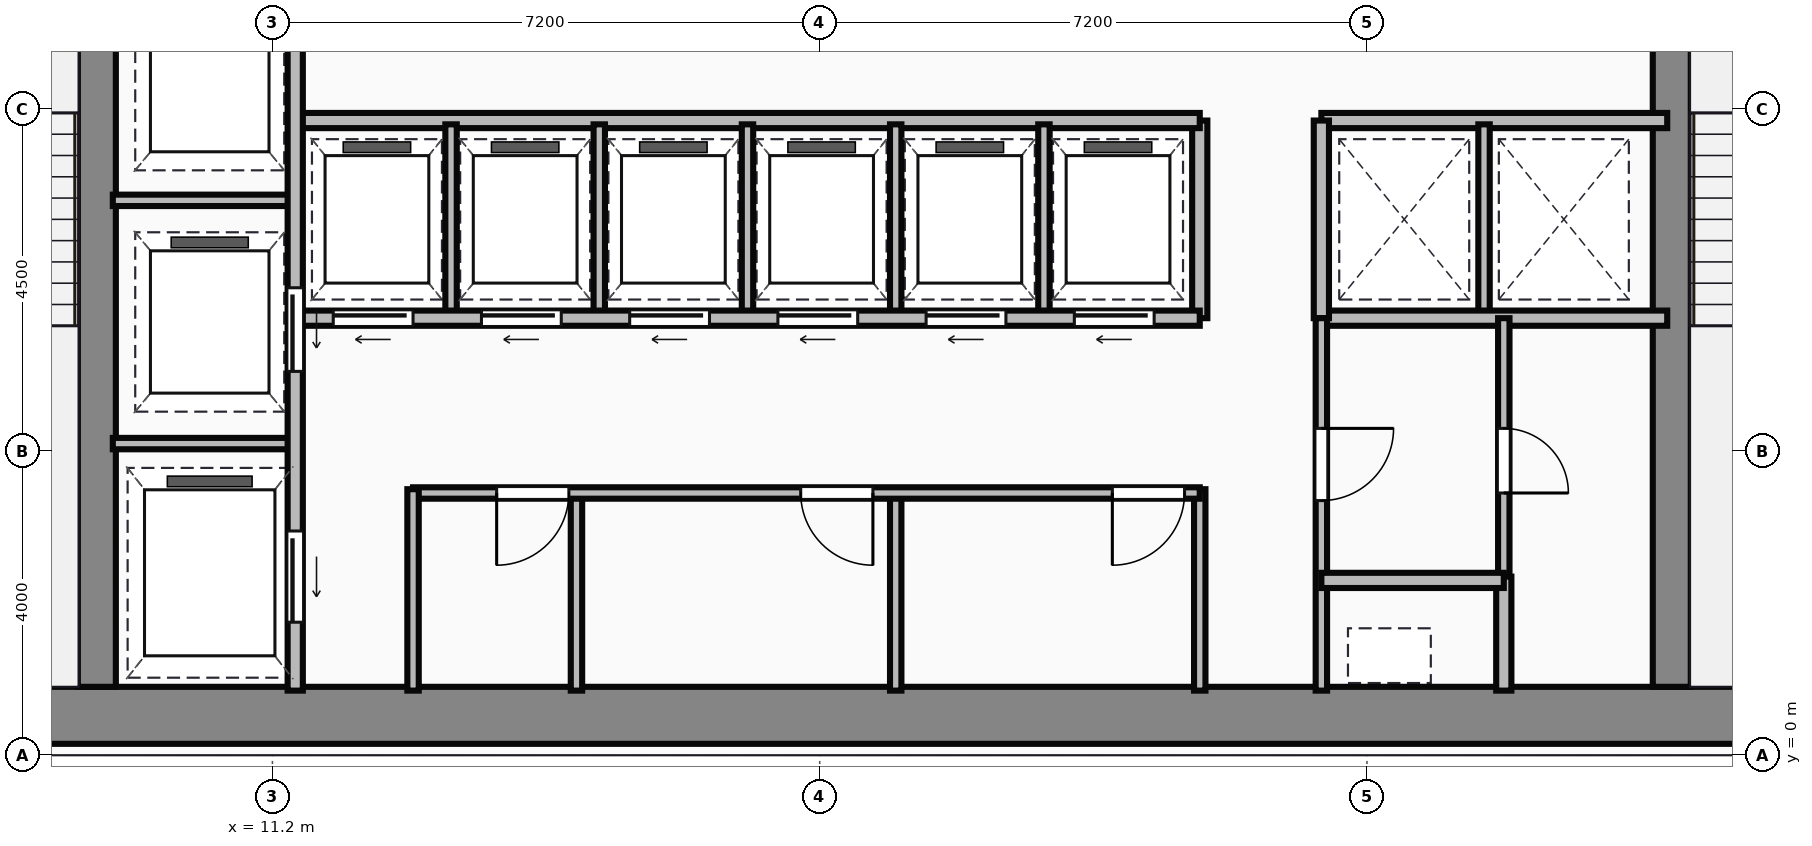
"""IFC4 building model, lengths in metres.
Left out: names, types, materials, properties, quantities, classifications, styles, units other than length and angle.
Written with IfcOpenShell. Run it as: python <this file> out.ifc"""

import sys

from ifc_helpers import new_model, si_unit, direction, frame, frame_2d, origin, place, context, subcontext, project, spatial, rectangle, extrude, source, transform, mapped, element, fill, save


model = new_model("IFC4")
c1 = context("Model", 3, precision=1e-05, world=origin(), true_north=direction((0.0, 1.0)))
c2 = subcontext(c1, "Body", "Model", "MODEL_VIEW")
j1 = project(units=[si_unit("LENGTHUNIT", "METRE"), si_unit("PLANEANGLEUNIT", "RADIAN")], contexts=[c1])
p1 = place(None, origin())
s1 = spatial("IfcSite", under=j1, at=p1, CompositionType="ELEMENT")
p2 = place(p1, origin())
s2 = spatial("IfcBuilding", under=s1, at=p2, CompositionType="ELEMENT")
p3 = place(p2, frame((0.0, 0.0, 177.1)))
s3 = spatial("IfcBuildingStorey", under=s2, at=p3, CompositionType="ELEMENT", Elevation=177.1)
m1 = source(origin(), c2, "Body", "SweptSolid", [
    extrude(rectangle(XDim=29.5, YDim=0.75, at=frame_2d((14.75, 0.0))), origin(), (0.0, 0.0, 1.0), 3.65),
])
p4 = place(p3, frame((4.5, 0.525, 0.0), z_axis=(0.0, 0.0, 1.0), x_axis=(1.0, 0.0, 0.0)))
e1 = element("IfcWall", 1, at=p4, inside=s3, PredefinedType="SHEAR", context=c2, shape_type="MappedRepresentation", body=[
    mapped(m1, transform((0.0, 0.0, 0.0))),
])
m2 = source(origin(), c2, "Body", "SweptSolid", [
    extrude(rectangle(XDim=12.35, YDim=0.5, at=frame_2d((6.175, 0.0))), origin(), (0.0, 0.0, 1.0), 3.65),
])
for number, where, z_axis, x_axis in (
    (2, (8.89, 0.9, 0.0), (0.0, 0.0, 1.0), (0.0, 1.0, 0.0)),
    (3, (29.61, 0.9, 0.0), (0.0, 0.0, 1.0), (0.0, 1.0, 0.0)),
):
    element("IfcWall", number, at=place(p3, frame(where, z_axis=z_axis, x_axis=x_axis)), inside=s3, PredefinedType="SHEAR", context=c2, shape_type="MappedRepresentation", body=[
        mapped(m2, transform((0.0, 0.0, 0.0))),
    ])
m3 = source(origin(), c2, "Body", "SweptSolid", [
    extrude(rectangle(XDim=9.6, YDim=0.2, at=frame_2d((4.8, 0.0))), origin(), (0.0, 0.0, 1.0), 3.4),
])
p5 = place(p3, frame((11.5, 0.85, 0.0), z_axis=(0.0, 0.0, 1.0), x_axis=(0.0, 1.0, 0.0)))
e4 = element("IfcWall", 4, at=p5, inside=s3, PredefinedType="PARTITIONING", context=c2, shape_type="MappedRepresentation", body=[
    mapped(m3, transform((0.0, 0.0, 0.0))),
])
p6 = place(p5, frame((4.2, 0.0, 0.0)))
e5 = element("IfcOpeningElement", 5, at=p6, cuts=e4, PredefinedType="OPENING", context=c2, shape_type="SweptSolid", body=[
    extrude(rectangle(XDim=1.1, YDim=2.15, at=frame_2d((0.55, 1.075))), frame((0.0, 0.11, 0.0), z_axis=(0.0, -1.0, 0.0), x_axis=(1.0, 0.0, 0.0)), (0.0, 0.0, 1.0), 0.22),
])
p7 = place(p5, frame((0.9, 0.0, 0.0)))
e6 = element("IfcOpeningElement", 6, at=p7, cuts=e4, PredefinedType="OPENING", context=c2, shape_type="SweptSolid", body=[
    extrude(rectangle(XDim=1.2, YDim=2.15, at=frame_2d((0.6, 1.075))), frame((0.0, 0.11, 0.0), z_axis=(0.0, -1.0, 0.0), x_axis=(1.0, 0.0, 0.0)), (0.0, 0.0, 1.0), 0.22),
])
m4 = source(origin(), c2, "Body", "SweptSolid", [
    extrude(rectangle(XDim=2.4, YDim=0.15, at=frame_2d((1.2, 0.0))), origin(), (0.0, 0.0, 1.0), 3.4),
])
for number, where, z_axis, x_axis in (
    (7, (9.1, 4.1, 0.0), (0.0, 0.0, 1.0), (1.0, 0.0, 0.0)),
    (8, (9.1, 7.3, 0.0), (0.0, 0.0, 1.0), (1.0, 0.0, 0.0)),
):
    element("IfcWall", number, at=place(p3, frame(where, z_axis=z_axis, x_axis=x_axis)), inside=s3, PredefinedType="PARTITIONING", context=c2, shape_type="MappedRepresentation", body=[
        mapped(m4, transform((0.0, 0.0, 0.0))),
    ])
m5 = source(origin(), c2, "Body", "SweptSolid", [
    extrude(rectangle(XDim=2.65, YDim=0.15, at=frame_2d((1.325, 0.0))), origin(), (0.0, 0.0, 1.0), 3.4),
])
p8 = place(p3, frame((13.05, 0.85, 0.0), z_axis=(0.0, 0.0, 1.0), x_axis=(0.0, 1.0, 0.0)))
e9 = element("IfcWall", 9, at=p8, inside=s3, PredefinedType="PARTITIONING", context=c2, shape_type="MappedRepresentation", body=[
    mapped(m5, transform((0.0, 0.0, 0.0))),
])
m6 = source(origin(), c2, "Body", "SweptSolid", [
    extrude(rectangle(XDim=10.35, YDim=0.15, at=frame_2d((5.175, 0.0))), origin(), (0.0, 0.0, 1.0), 3.4),
])
p9 = place(p3, frame((13.05, 3.45, 0.0), z_axis=(0.0, 0.0, 1.0), x_axis=(1.0, 0.0, 0.0)))
e10 = element("IfcWall", 10, at=p9, inside=s3, PredefinedType="PARTITIONING", context=c2, shape_type="MappedRepresentation", body=[
    mapped(m6, transform((0.0, 0.0, 0.0))),
])
p10 = place(p9, frame((1.1, 0.0, 0.0)))
e11 = element("IfcOpeningElement", 11, at=p10, cuts=e10, PredefinedType="OPENING", context=c2, shape_type="SweptSolid", body=[
    extrude(rectangle(XDim=0.95, YDim=2.15, at=frame_2d((0.475, 1.075))), frame((0.0, 0.085, 0.0), z_axis=(0.0, -1.0, 0.0), x_axis=(1.0, 0.0, 0.0)), (0.0, 0.0, 1.0), 0.17),
])
p11 = place(p9, frame((5.1, 0.0, 0.0)))
e12 = element("IfcOpeningElement", 12, at=p11, cuts=e10, PredefinedType="OPENING", context=c2, shape_type="SweptSolid", body=[
    extrude(rectangle(XDim=0.95, YDim=2.15, at=frame_2d((0.475, 1.075))), frame((0.0, 0.085, 0.0), z_axis=(0.0, -1.0, 0.0), x_axis=(1.0, 0.0, 0.0)), (0.0, 0.0, 1.0), 0.17),
])
p12 = place(p9, frame((9.2, 0.0, 0.0)))
e13 = element("IfcOpeningElement", 13, at=p12, cuts=e10, PredefinedType="OPENING", context=c2, shape_type="SweptSolid", body=[
    extrude(rectangle(XDim=0.95, YDim=2.15, at=frame_2d((0.475, 1.075))), frame((0.0, 0.085, 0.0), z_axis=(0.0, -1.0, 0.0), x_axis=(1.0, 0.0, 0.0)), (0.0, 0.0, 1.0), 0.17),
])
p13 = place(p3, frame((23.4, 0.85, 0.0), z_axis=(0.0, 0.0, 1.0), x_axis=(0.0, 1.0, 0.0)))
e14 = element("IfcWall", 14, at=p13, inside=s3, PredefinedType="PARTITIONING", context=c2, shape_type="MappedRepresentation", body=[
    mapped(m5, transform((0.0, 0.0, 0.0))),
])
m7 = source(origin(), c2, "Body", "SweptSolid", [
    extrude(rectangle(XDim=2.6, YDim=0.15, at=frame_2d((1.3, 0.0))), origin(), (0.0, 0.0, 1.0), 3.4),
])
for number, where, z_axis, x_axis in (
    (15, (15.2, 0.85, 0.0), (0.0, 0.0, 1.0), (0.0, 1.0, 0.0)),
    (16, (19.4, 0.85, 0.0), (0.0, 0.0, 1.0), (0.0, 1.0, 0.0)),
):
    element("IfcWall", number, at=place(p3, frame(where, z_axis=z_axis, x_axis=x_axis)), inside=s3, PredefinedType="PARTITIONING", context=c2, shape_type="MappedRepresentation", body=[
        mapped(m7, transform((0.0, 0.0, 0.0))),
    ])
m8 = source(origin(), c2, "Body", "SweptSolid", [
    extrude(rectangle(XDim=11.85, YDim=0.2, at=frame_2d((5.925, 0.0))), origin(), (0.0, 0.0, 1.0), 3.4),
])
p14 = place(p3, frame((11.55, 5.75, 0.0), z_axis=(0.0, 0.0, 1.0), x_axis=(1.0, 0.0, 0.0)))
e17 = element("IfcWall", 17, at=p14, inside=s3, PredefinedType="PARTITIONING", context=c2, shape_type="MappedRepresentation", body=[
    mapped(m8, transform((0.0, 0.0, 0.0))),
])
p15 = place(p14, frame((0.45, 0.0, 0.0)))
e18 = element("IfcOpeningElement", 18, at=p15, cuts=e17, PredefinedType="OPENING", context=c2, shape_type="SweptSolid", body=[
    extrude(rectangle(XDim=1.05, YDim=2.15, at=frame_2d((0.525, 1.075))), frame((0.0, 0.11, 0.0), z_axis=(0.0, -1.0, 0.0), x_axis=(1.0, 0.0, 0.0)), (0.0, 0.0, 1.0), 0.22),
])
p16 = place(p14, frame((2.4, 0.0, 0.0)))
e19 = element("IfcOpeningElement", 19, at=p16, cuts=e17, PredefinedType="OPENING", context=c2, shape_type="SweptSolid", body=[
    extrude(rectangle(XDim=1.05, YDim=2.15, at=frame_2d((0.525, 1.075))), frame((0.0, 0.11, 0.0), z_axis=(0.0, -1.0, 0.0), x_axis=(1.0, 0.0, 0.0)), (0.0, 0.0, 1.0), 0.22),
])
p17 = place(p14, frame((4.35, 0.0, 0.0)))
e20 = element("IfcOpeningElement", 20, at=p17, cuts=e17, PredefinedType="OPENING", context=c2, shape_type="SweptSolid", body=[
    extrude(rectangle(XDim=1.05, YDim=2.15, at=frame_2d((0.525, 1.075))), frame((0.0, 0.11, 0.0), z_axis=(0.0, -1.0, 0.0), x_axis=(1.0, 0.0, 0.0)), (0.0, 0.0, 1.0), 0.22),
])
p18 = place(p14, frame((6.3, 0.0, 0.0)))
e21 = element("IfcOpeningElement", 21, at=p18, cuts=e17, PredefinedType="OPENING", context=c2, shape_type="SweptSolid", body=[
    extrude(rectangle(XDim=1.05, YDim=2.15, at=frame_2d((0.525, 1.075))), frame((0.0, 0.11, 0.0), z_axis=(0.0, -1.0, 0.0), x_axis=(1.0, 0.0, 0.0)), (0.0, 0.0, 1.0), 0.22),
])
p19 = place(p14, frame((8.25, 0.0, 0.0)))
e22 = element("IfcOpeningElement", 22, at=p19, cuts=e17, PredefinedType="OPENING", context=c2, shape_type="SweptSolid", body=[
    extrude(rectangle(XDim=1.05, YDim=2.15, at=frame_2d((0.525, 1.075))), frame((0.0, 0.11, 0.0), z_axis=(0.0, -1.0, 0.0), x_axis=(1.0, 0.0, 0.0)), (0.0, 0.0, 1.0), 0.22),
])
p20 = place(p14, frame((10.2, 0.0, 0.0)))
e23 = element("IfcOpeningElement", 23, at=p20, cuts=e17, PredefinedType="OPENING", context=c2, shape_type="SweptSolid", body=[
    extrude(rectangle(XDim=1.05, YDim=2.15, at=frame_2d((0.525, 1.075))), frame((0.0, 0.11, 0.0), z_axis=(0.0, -1.0, 0.0), x_axis=(1.0, 0.0, 0.0)), (0.0, 0.0, 1.0), 0.22),
])
p21 = place(p3, frame((11.55, 8.35, 0.0), z_axis=(0.0, 0.0, 1.0), x_axis=(1.0, 0.0, 0.0)))
e24 = element("IfcWall", 24, at=p21, inside=s3, PredefinedType="PARTITIONING", context=c2, shape_type="MappedRepresentation", body=[
    mapped(m8, transform((0.0, 0.0, 0.0))),
])
m9 = source(origin(), c2, "Body", "SweptSolid", [
    extrude(rectangle(XDim=2.6, YDim=0.2, at=frame_2d((1.3, 0.0))), origin(), (0.0, 0.0, 1.0), 3.4),
])
p22 = place(p3, frame((23.4, 5.75, 0.0), z_axis=(0.0, 0.0, 1.0), x_axis=(0.0, 1.0, 0.0)))
e25 = element("IfcWall", 25, at=p22, inside=s3, PredefinedType="PARTITIONING", context=c2, shape_type="MappedRepresentation", body=[
    mapped(m9, transform((0.0, 0.0, 0.0))),
])
m10 = source(origin(), c2, "Body", "SweptSolid", [
    extrude(rectangle(XDim=2.5, YDim=0.15, at=frame_2d((1.25, 0.0))), origin(), (0.0, 0.0, 1.0), 3.4),
])
for number, where, z_axis, x_axis in (
    (26, (13.55, 5.8, 0.0), (0.0, 0.0, 1.0), (0.0, 1.0, 0.0)),
    (27, (15.5, 5.8, 0.0), (0.0, 0.0, 1.0), (0.0, 1.0, 0.0)),
    (28, (17.45, 5.8, 0.0), (0.0, 0.0, 1.0), (0.0, 1.0, 0.0)),
    (29, (19.4, 5.8, 0.0), (0.0, 0.0, 1.0), (0.0, 1.0, 0.0)),
    (30, (21.35, 5.8, 0.0), (0.0, 0.0, 1.0), (0.0, 1.0, 0.0)),
):
    element("IfcWall", number, at=place(p3, frame(where, z_axis=z_axis, x_axis=x_axis)), inside=s3, PredefinedType="PARTITIONING", context=c2, shape_type="MappedRepresentation", body=[
        mapped(m10, transform((0.0, 0.0, 0.0))),
    ])
m11 = source(origin(), c2, "Body", "SweptSolid", [
    extrude(rectangle(XDim=4.55, YDim=0.2, at=frame_2d((2.275, 0.0))), origin(), (0.0, 0.0, 1.0), 3.4),
])
for number, where, z_axis, x_axis in (
    (31, (25.0, 8.35, 0.0), (0.0, 0.0, 1.0), (1.0, 0.0, 0.0)),
    (32, (25.0, 5.75, 0.0), (0.0, 0.0, 1.0), (1.0, 0.0, 0.0)),
):
    element("IfcWall", number, at=place(p3, frame(where, z_axis=z_axis, x_axis=x_axis)), inside=s3, PredefinedType="PARTITIONING", context=c2, shape_type="MappedRepresentation", body=[
        mapped(m11, transform((0.0, 0.0, 0.0))),
    ])
p23 = place(p3, frame((25.0, 5.75, 0.0), z_axis=(0.0, 0.0, 1.0), x_axis=(0.0, 1.0, 0.0)))
e33 = element("IfcWall", 33, at=p23, inside=s3, PredefinedType="PARTITIONING", context=c2, shape_type="MappedRepresentation", body=[
    mapped(m9, transform((0.0, 0.0, 0.0))),
])
p24 = place(p3, frame((27.14, 5.8, 0.0), z_axis=(0.0, 0.0, 1.0), x_axis=(0.0, 1.0, 0.0)))
e34 = element("IfcWall", 34, at=p24, inside=s3, PredefinedType="PARTITIONING", context=c2, shape_type="MappedRepresentation", body=[
    mapped(m10, transform((0.0, 0.0, 0.0))),
])
m12 = source(origin(), c2, "Body", "SweptSolid", [
    extrude(rectangle(XDim=4.9, YDim=0.15, at=frame_2d((2.45, 0.0))), origin(), (0.0, 0.0, 1.0), 3.4),
])
p25 = place(p3, frame((25.0, 0.85, 0.0), z_axis=(0.0, 0.0, 1.0), x_axis=(0.0, 1.0, 0.0)))
e35 = element("IfcWall", 35, at=p25, inside=s3, PredefinedType="PARTITIONING", context=c2, shape_type="MappedRepresentation", body=[
    mapped(m12, transform((0.0, 0.0, 0.0))),
])
p26 = place(p25, frame((2.5, 0.0, 0.0)))
e36 = element("IfcOpeningElement", 36, at=p26, cuts=e35, PredefinedType="OPENING", context=c2, shape_type="SweptSolid", body=[
    extrude(rectangle(XDim=0.95, YDim=2.15, at=frame_2d((0.475, 1.075))), frame((0.0, 0.085, 0.0), z_axis=(0.0, -1.0, 0.0), x_axis=(1.0, 0.0, 0.0)), (0.0, 0.0, 1.0), 0.17),
])
m13 = source(origin(), c2, "Body", "SweptSolid", [
    extrude(rectangle(XDim=2.4, YDim=0.2, at=frame_2d((1.2, 0.0))), origin(), (0.0, 0.0, 1.0), 3.4),
])
p27 = place(p3, frame((25.0, 2.3, 0.0), z_axis=(0.0, 0.0, 1.0), x_axis=(1.0, 0.0, 0.0)))
e37 = element("IfcWall", 37, at=p27, inside=s3, PredefinedType="PARTITIONING", context=c2, shape_type="MappedRepresentation", body=[
    mapped(m13, transform((0.0, 0.0, 0.0))),
])
m14 = source(origin(), c2, "Body", "SweptSolid", [
    extrude(rectangle(XDim=1.5, YDim=0.2, at=frame_2d((0.75, 0.0))), origin(), (0.0, 0.0, 1.0), 3.4),
])
p28 = place(p3, frame((27.4, 0.85, 0.0), z_axis=(0.0, 0.0, 1.0), x_axis=(0.0, 1.0, 0.0)))
e38 = element("IfcWall", 38, at=p28, inside=s3, PredefinedType="PARTITIONING", context=c2, shape_type="MappedRepresentation", body=[
    mapped(m14, transform((0.0, 0.0, 0.0))),
])
m15 = source(origin(), c2, "Body", "SweptSolid", [
    extrude(rectangle(XDim=3.4, YDim=0.15, at=frame_2d((1.7, 0.0))), origin(), (0.0, 0.0, 1.0), 3.4),
])
p29 = place(p3, frame((27.4, 2.35, 0.0), z_axis=(0.0, 0.0, 1.0), x_axis=(0.0, 1.0, 0.0)))
e39 = element("IfcWall", 39, at=p29, inside=s3, PredefinedType="PARTITIONING", context=c2, shape_type="MappedRepresentation", body=[
    mapped(m15, transform((0.0, 0.0, 0.0))),
])
p30 = place(p29, frame((1.1, 0.0, 0.0)))
e40 = element("IfcOpeningElement", 40, at=p30, cuts=e39, PredefinedType="OPENING", context=c2, shape_type="SweptSolid", body=[
    extrude(rectangle(XDim=0.85, YDim=2.1, at=frame_2d((0.425, 1.05))), frame((0.0, 0.085, 0.0), z_axis=(0.0, -1.0, 0.0), x_axis=(1.0, 0.0, 0.0)), (0.0, 0.0, 1.0), 0.17),
])
m16 = source(origin(), c2, "Body", "SweptSolid", [
    extrude(rectangle(XDim=1.1, YDim=2.15, at=frame_2d((0.55, 1.075))), frame((0.0, 0.025, 0.0), z_axis=(0.0, -1.0, 0.0), x_axis=(1.0, 0.0, 0.0)), (0.0, 0.0, 1.0), 0.05),
])
p31 = place(p6, frame((1.1, 0.0, 0.0), z_axis=(0.0, 0.0, 1.0), x_axis=(-1.0, 0.0, 0.0)))
e41 = element("IfcDoor", 41, at=p31, inside=s3, OperationType="SLIDING_TO_LEFT", PredefinedType="DOOR", context=c2, shape_type="MappedRepresentation", body=[
    mapped(m16, transform((0.0, 0.0, 0.0))),
])
fill(e5, e41)
m17 = source(origin(), c2, "Body", "SweptSolid", [
    extrude(rectangle(XDim=1.2, YDim=2.15, at=frame_2d((0.6, 1.075))), frame((0.0, 0.025, 0.0), z_axis=(0.0, -1.0, 0.0), x_axis=(1.0, 0.0, 0.0)), (0.0, 0.0, 1.0), 0.05),
])
p32 = place(p7, frame((1.2, 0.0, 0.0), z_axis=(0.0, 0.0, 1.0), x_axis=(-1.0, 0.0, 0.0)))
e42 = element("IfcDoor", 42, at=p32, inside=s3, OperationType="SLIDING_TO_LEFT", PredefinedType="DOOR", context=c2, shape_type="MappedRepresentation", body=[
    mapped(m17, transform((0.0, 0.0, 0.0))),
])
fill(e6, e42)
m18 = source(origin(), c2, "Body", "SweptSolid", [
    extrude(rectangle(XDim=0.95, YDim=2.15, at=frame_2d((0.475, 1.075))), frame((0.0, 0.025, 0.0), z_axis=(0.0, -1.0, 0.0), x_axis=(1.0, 0.0, 0.0)), (0.0, 0.0, 1.0), 0.05),
])
p33 = place(p10, origin())
e43 = element("IfcDoor", 43, at=p33, inside=s3, OperationType="SINGLE_SWING_LEFT", PredefinedType="DOOR", context=c2, shape_type="MappedRepresentation", body=[
    mapped(m18, transform((0.0, 0.0, 0.0))),
])
fill(e11, e43)
p34 = place(p11, origin())
e44 = element("IfcDoor", 44, at=p34, inside=s3, OperationType="SINGLE_SWING_RIGHT", PredefinedType="DOOR", context=c2, shape_type="MappedRepresentation", body=[
    mapped(m18, transform((0.0, 0.0, 0.0))),
])
fill(e12, e44)
p35 = place(p12, origin())
e45 = element("IfcDoor", 45, at=p35, inside=s3, OperationType="SINGLE_SWING_LEFT", PredefinedType="DOOR", context=c2, shape_type="MappedRepresentation", body=[
    mapped(m18, transform((0.0, 0.0, 0.0))),
])
fill(e13, e45)
m19 = source(origin(), c2, "Body", "SweptSolid", [
    extrude(rectangle(XDim=1.05, YDim=2.15, at=frame_2d((0.525, 1.075))), frame((0.0, 0.025, 0.0), z_axis=(0.0, -1.0, 0.0), x_axis=(1.0, 0.0, 0.0)), (0.0, 0.0, 1.0), 0.05),
])
p36 = place(p15, frame((1.05, 0.0, 0.0), z_axis=(0.0, 0.0, 1.0), x_axis=(-1.0, 0.0, 0.0)))
e46 = element("IfcDoor", 46, at=p36, inside=s3, OperationType="SLIDING_TO_LEFT", PredefinedType="DOOR", context=c2, shape_type="MappedRepresentation", body=[
    mapped(m19, transform((0.0, 0.0, 0.0))),
])
fill(e18, e46)
p37 = place(p16, frame((1.05, 0.0, 0.0), z_axis=(0.0, 0.0, 1.0), x_axis=(-1.0, 0.0, 0.0)))
e47 = element("IfcDoor", 47, at=p37, inside=s3, OperationType="SLIDING_TO_LEFT", PredefinedType="DOOR", context=c2, shape_type="MappedRepresentation", body=[
    mapped(m19, transform((0.0, 0.0, 0.0))),
])
fill(e19, e47)
p38 = place(p17, frame((1.05, 0.0, 0.0), z_axis=(0.0, 0.0, 1.0), x_axis=(-1.0, 0.0, 0.0)))
e48 = element("IfcDoor", 48, at=p38, inside=s3, OperationType="SLIDING_TO_LEFT", PredefinedType="DOOR", context=c2, shape_type="MappedRepresentation", body=[
    mapped(m19, transform((0.0, 0.0, 0.0))),
])
fill(e20, e48)
p39 = place(p18, frame((1.05, 0.0, 0.0), z_axis=(0.0, 0.0, 1.0), x_axis=(-1.0, 0.0, 0.0)))
e49 = element("IfcDoor", 49, at=p39, inside=s3, OperationType="SLIDING_TO_LEFT", PredefinedType="DOOR", context=c2, shape_type="MappedRepresentation", body=[
    mapped(m19, transform((0.0, 0.0, 0.0))),
])
fill(e21, e49)
p40 = place(p19, frame((1.05, 0.0, 0.0), z_axis=(0.0, 0.0, 1.0), x_axis=(-1.0, 0.0, 0.0)))
e50 = element("IfcDoor", 50, at=p40, inside=s3, OperationType="SLIDING_TO_LEFT", PredefinedType="DOOR", context=c2, shape_type="MappedRepresentation", body=[
    mapped(m19, transform((0.0, 0.0, 0.0))),
])
fill(e22, e50)
p41 = place(p20, frame((1.05, 0.0, 0.0), z_axis=(0.0, 0.0, 1.0), x_axis=(-1.0, 0.0, 0.0)))
e51 = element("IfcDoor", 51, at=p41, inside=s3, OperationType="SLIDING_TO_LEFT", PredefinedType="DOOR", context=c2, shape_type="MappedRepresentation", body=[
    mapped(m19, transform((0.0, 0.0, 0.0))),
])
fill(e23, e51)
p42 = place(p26, origin())
e52 = element("IfcDoor", 52, at=p42, inside=s3, OperationType="SINGLE_SWING_RIGHT", PredefinedType="DOOR", context=c2, shape_type="MappedRepresentation", body=[
    mapped(m18, transform((0.0, 0.0, 0.0))),
])
fill(e36, e52)
m20 = source(origin(), c2, "Body", "SweptSolid", [
    extrude(rectangle(XDim=0.85, YDim=2.1, at=frame_2d((0.425, 1.05))), frame((0.0, 0.025, 0.0), z_axis=(0.0, -1.0, 0.0), x_axis=(1.0, 0.0, 0.0)), (0.0, 0.0, 1.0), 0.05),
])
p43 = place(p30, frame((0.85, 0.0, 0.0), z_axis=(0.0, 0.0, 1.0), x_axis=(-1.0, 0.0, 0.0)))
e53 = element("IfcDoor", 53, at=p43, inside=s3, OperationType="SINGLE_SWING_LEFT", PredefinedType="DOOR", context=c2, shape_type="MappedRepresentation", body=[
    mapped(m20, transform((0.0, 0.0, 0.0))),
])
fill(e40, e53)
save(model, sys.argv[1])
